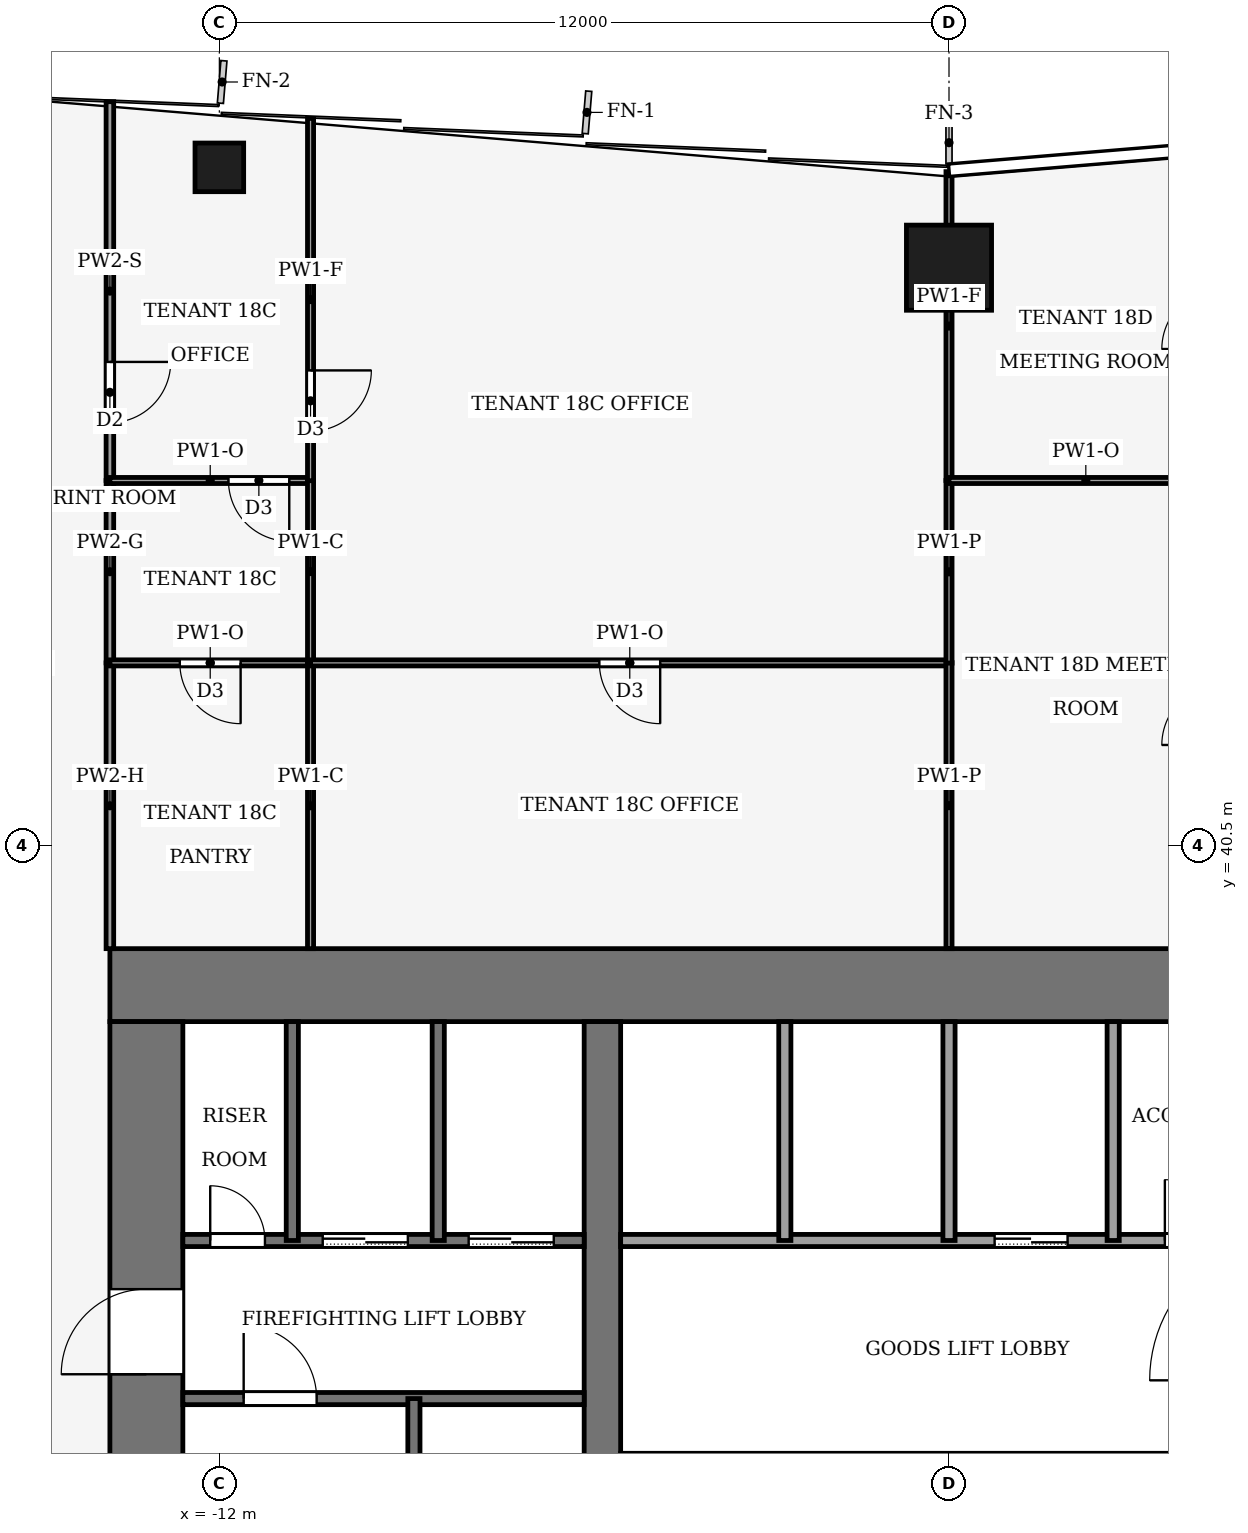
"""IFC4 building model, lengths in metres.
Left out: names, types, materials, properties, quantities, classifications, styles, units other than length and angle.
Written with IfcOpenShell. Run it as: python <this file> out.ifc"""

import sys

from ifc_helpers import new_model, si_unit, direction, frame, frame_2d, origin, origin_2d, place, context, subcontext, project, spatial, rectangle, hollow_rectangle, extrude, element, fill, save


model = new_model("IFC4")
c1 = context("Model", 3, precision=1e-05, world=origin(), true_north=direction((0.0, 1.0)))
c2 = subcontext(c1, "Body", "Model", "MODEL_VIEW")
j1 = project(units=[si_unit("LENGTHUNIT", "METRE"), si_unit("PLANEANGLEUNIT", "RADIAN")], contexts=[c1])
p1 = place(None, origin())
s1 = spatial("IfcSite", under=j1, at=p1, CompositionType="ELEMENT")
p2 = place(p1, origin())
s2 = spatial("IfcBuilding", under=s1, at=p2, CompositionType="ELEMENT")
p3 = place(p2, frame((0.0, 0.0, 82.0)))
s3 = spatial("IfcBuildingStorey", under=s2, at=p3, CompositionType="ELEMENT", Elevation=82.0)
p4 = place(p3, frame((-13.8, 38.2, -0.13), z_axis=(0.0, 0.0, 1.0), x_axis=(1.0, 0.0, 0.0)))
e1 = element("IfcWall", 1, at=p4, inside=s3, PredefinedType="SHEAR", context=c2, shape_type="SweptSolid", body=[
    extrude(rectangle(XDim=27.6, YDim=1.2, at=frame_2d((13.8, 0.0))), origin(), (0.0, 0.0, 1.0), 4.0),
])
p5 = place(p3, frame((-13.2, 18.4, -0.13), z_axis=(0.0, 0.0, 1.0), x_axis=(0.0, 1.0, 0.0)))
e2 = element("IfcWall", 2, at=p5, inside=s3, PredefinedType="SHEAR", context=c2, shape_type="SweptSolid", body=[
    extrude(rectangle(XDim=19.2, YDim=1.2, at=frame_2d((9.6, 0.0))), origin(), (0.0, 0.0, 1.0), 4.0),
])
p6 = place(p5, frame((2.8, 0.0, 0.13)))
e3 = element("IfcOpeningElement", 3, at=p6, cuts=e2, PredefinedType="OPENING", context=c2, shape_type="SweptSolid", body=[
    extrude(rectangle(XDim=2.4, YDim=2.4, at=frame_2d((1.2, 1.2))), frame((0.0, 0.61, 0.0), z_axis=(0.0, -1.0, 0.0), x_axis=(1.0, 0.0, 0.0)), (0.0, 0.0, 1.0), 1.22),
])
p7 = place(p5, frame((13.4, 0.0, 0.13)))
e4 = element("IfcOpeningElement", 4, at=p7, cuts=e2, PredefinedType="OPENING", context=c2, shape_type="SweptSolid", body=[
    extrude(rectangle(XDim=1.4, YDim=2.2, at=frame_2d((0.7, 1.1))), frame((0.0, 0.61, 0.0), z_axis=(0.0, -1.0, 0.0), x_axis=(1.0, 0.0, 0.0)), (0.0, 0.0, 1.0), 1.22),
])
p8 = place(p3, frame((-5.7, 18.4, -0.13), z_axis=(0.0, 0.0, 1.0), x_axis=(0.0, 1.0, 0.0)))
e5 = element("IfcWall", 5, at=p8, inside=s3, PredefinedType="SHEAR", context=c2, shape_type="SweptSolid", body=[
    extrude(rectangle(XDim=19.2, YDim=0.6, at=frame_2d((9.6, 0.0))), origin(), (0.0, 0.0, 1.0), 4.0),
])
p9 = place(p8, frame((8.35, 0.0, 0.13)))
e6 = element("IfcOpeningElement", 6, at=p9, cuts=e5, PredefinedType="OPENING", context=c2, shape_type="SweptSolid", body=[
    extrude(rectangle(XDim=0.9, YDim=2.1, at=frame_2d((0.45, 1.05))), frame((0.0, 0.31, 0.0), z_axis=(0.0, -1.0, 0.0), x_axis=(1.0, 0.0, 0.0)), (0.0, 0.0, 1.0), 0.62),
])
p10 = place(p3, frame((0.0, 50.0, 0.0), z_axis=(0.0, 0.0, 1.0), x_axis=(1.0, 0.0, 0.0)))
e7 = element("IfcColumn", 7, at=p10, inside=s3, PredefinedType="COLUMN", context=c2, shape_type="SweptSolid", body=[
    extrude(hollow_rectangle(XDim=1.4, YDim=1.4, WallThickness=0.08, at=origin_2d()), origin(), (0.0, 0.0, 1.0), 4.0),
])
p11 = place(p3, frame((-12.0, 51.65, 0.0), z_axis=(0.0, 0.0, 1.0), x_axis=(1.0, 0.0, 0.0)))
e8 = element("IfcColumn", 8, at=p11, inside=s3, PredefinedType="COLUMN", context=c2, shape_type="SweptSolid", body=[
    extrude(hollow_rectangle(XDim=0.8, YDim=0.8, WallThickness=0.04, at=origin_2d()), origin(), (0.0, 0.0, 1.0), 4.0),
])
p12 = place(p3, frame((-12.6, 31.4, 0.0), z_axis=(0.0, 0.0, 1.0), x_axis=(1.0, 0.0, 0.0)))
e9 = element("IfcWall", 9, at=p12, inside=s3, PredefinedType="PARTITIONING", context=c2, shape_type="SweptSolid", body=[
    extrude(rectangle(XDim=6.6, YDim=0.2, at=frame_2d((3.3, 0.0))), origin(), (0.0, 0.0, 1.0), 3.87),
])
p13 = place(p12, frame((1.0, 0.0, 0.0)))
e10 = element("IfcOpeningElement", 10, at=p13, cuts=e9, PredefinedType="OPENING", context=c2, shape_type="SweptSolid", body=[
    extrude(rectangle(XDim=1.2, YDim=2.2, at=frame_2d((0.6, 1.1))), frame((0.0, 0.11, 0.0), z_axis=(0.0, -1.0, 0.0), x_axis=(1.0, 0.0, 0.0)), (0.0, 0.0, 1.0), 0.22),
])
p14 = place(p3, frame((-12.6, 34.0, 0.0), z_axis=(0.0, 0.0, 1.0), x_axis=(1.0, 0.0, 0.0)))
e11 = element("IfcWall", 11, at=p14, inside=s3, PredefinedType="PARTITIONING", context=c2, shape_type="SweptSolid", body=[
    extrude(rectangle(XDim=6.6, YDim=0.2, at=frame_2d((3.3, 0.0))), origin(), (0.0, 0.0, 1.0), 3.87),
])
p15 = place(p14, frame((4.7, 0.0, 0.0)))
e12 = element("IfcOpeningElement", 12, at=p15, cuts=e11, PredefinedType="OPENING", context=c2, shape_type="SweptSolid", body=[
    extrude(rectangle(XDim=1.4, YDim=2.2, at=frame_2d((0.7, 1.1))), frame((0.0, 0.11, 0.0), z_axis=(0.0, -1.0, 0.0), x_axis=(1.0, 0.0, 0.0)), (0.0, 0.0, 1.0), 0.22),
])
p16 = place(p14, frame((2.3, 0.0, 0.0)))
e13 = element("IfcOpeningElement", 13, at=p16, cuts=e11, PredefinedType="OPENING", context=c2, shape_type="SweptSolid", body=[
    extrude(rectangle(XDim=1.4, YDim=2.2, at=frame_2d((0.7, 1.1))), frame((0.0, 0.11, 0.0), z_axis=(0.0, -1.0, 0.0), x_axis=(1.0, 0.0, 0.0)), (0.0, 0.0, 1.0), 0.22),
])
p17 = place(p14, frame((0.45, 0.0, 0.0)))
e14 = element("IfcOpeningElement", 14, at=p17, cuts=e11, PredefinedType="OPENING", context=c2, shape_type="SweptSolid", body=[
    extrude(rectangle(XDim=0.9, YDim=2.1, at=frame_2d((0.45, 1.05))), frame((0.0, 0.11, 0.0), z_axis=(0.0, -1.0, 0.0), x_axis=(1.0, 0.0, 0.0)), (0.0, 0.0, 1.0), 0.22),
])
p18 = place(p3, frame((-5.4, 34.0, 0.0), z_axis=(0.0, 0.0, 1.0), x_axis=(1.0, 0.0, 0.0)))
e15 = element("IfcWall", 15, at=p18, inside=s3, PredefinedType="PARTITIONING", context=c2, shape_type="SweptSolid", body=[
    extrude(rectangle(XDim=10.8, YDim=0.2, at=frame_2d((5.4, 0.0))), origin(), (0.0, 0.0, 1.0), 3.87),
])
p19 = place(p18, frame((6.15, 0.0, 0.0)))
e16 = element("IfcOpeningElement", 16, at=p19, cuts=e15, PredefinedType="OPENING", context=c2, shape_type="SweptSolid", body=[
    extrude(rectangle(XDim=1.2, YDim=2.2, at=frame_2d((0.6, 1.1))), frame((0.0, 0.11, 0.0), z_axis=(0.0, -1.0, 0.0), x_axis=(1.0, 0.0, 0.0)), (0.0, 0.0, 1.0), 0.22),
])
p20 = place(p18, frame((8.95, 0.0, 0.0)))
e17 = element("IfcOpeningElement", 17, at=p20, cuts=e15, PredefinedType="OPENING", context=c2, shape_type="SweptSolid", body=[
    extrude(rectangle(XDim=1.0, YDim=2.1, at=frame_2d((0.5, 1.05))), frame((0.0, 0.11, 0.0), z_axis=(0.0, -1.0, 0.0), x_axis=(1.0, 0.0, 0.0)), (0.0, 0.0, 1.0), 0.22),
])
p21 = place(p3, frame((-10.8, 34.0, 0.0), z_axis=(0.0, 0.0, 1.0), x_axis=(0.0, 1.0, 0.0)))
e18 = element("IfcWall", 18, at=p21, inside=s3, PredefinedType="PARTITIONING", context=c2, shape_type="SweptSolid", body=[
    extrude(rectangle(XDim=3.6, YDim=0.2, at=frame_2d((1.8, 0.0))), origin(), (0.0, 0.0, 1.0), 3.87),
])
p22 = place(p3, frame((-8.8, 24.0, 0.0), z_axis=(0.0, 0.0, 1.0), x_axis=(0.0, 1.0, 0.0)))
e19 = element("IfcWall", 19, at=p22, inside=s3, PredefinedType="PARTITIONING", context=c2, shape_type="SweptSolid", body=[
    extrude(rectangle(XDim=7.4, YDim=0.2, at=frame_2d((3.7, 0.0))), origin(), (0.0, 0.0, 1.0), 3.87),
])
for number, where, z_axis, x_axis in (
    (20, (-8.4, 34.0, 0.0), (0.0, 0.0, 1.0), (0.0, 1.0, 0.0)),
    (21, (-2.7, 34.0, 0.0), (0.0, 0.0, 1.0), (0.0, 1.0, 0.0)),
    (22, (0.0, 34.0, 0.0), (0.0, 0.0, 1.0), (0.0, 1.0, 0.0)),
    (23, (2.7, 34.0, 0.0), (0.0, 0.0, 1.0), (0.0, 1.0, 0.0)),
):
    element("IfcWall", number, at=place(p3, frame(where, z_axis=z_axis, x_axis=x_axis)), inside=s3, PredefinedType="PARTITIONING", context=c2, shape_type="SweptSolid", body=[
        extrude(rectangle(XDim=3.6, YDim=0.2, at=frame_2d((1.8, 0.0))), origin(), (0.0, 0.0, 1.0), 3.87),
    ])
p23 = place(p3, frame((-13.8, 38.8, 0.0), z_axis=(0.0, 0.0, 1.0), x_axis=(0.0, 1.0, 0.0)))
e24 = element("IfcWall", 24, at=p23, inside=s3, PredefinedType="PARTITIONING", context=c2, shape_type="SweptSolid", body=[
    extrude(rectangle(XDim=4.7, YDim=0.125, at=frame_2d((2.35, 0.0))), origin(), (0.0, 0.0, 1.0), 3.14),
])
p24 = place(p3, frame((-13.8, 43.5, 0.0), z_axis=(0.0, 0.0, 1.0), x_axis=(0.0, 1.0, 0.0)))
e25 = element("IfcWall", 25, at=p24, inside=s3, PredefinedType="PARTITIONING", context=c2, shape_type="SweptSolid", body=[
    extrude(rectangle(XDim=3.0, YDim=0.125, at=frame_2d((1.5, 0.0))), origin(), (0.0, 0.0, 1.0), 3.87),
])
p25 = place(p3, frame((-13.8, 52.73, 0.0), z_axis=(0.0, 0.0, 1.0), x_axis=(0.0, -1.0, 0.0)))
e26 = element("IfcWall", 26, at=p25, inside=s3, PredefinedType="PARTITIONING", context=c2, shape_type="SweptSolid", body=[
    extrude(rectangle(XDim=6.23, YDim=0.125, at=frame_2d((3.115, 0.0))), origin(), (0.0, 0.0, 1.0), 3.04),
])
p26 = place(p25, frame((4.28, 0.0, 0.0)))
e27 = element("IfcOpeningElement", 27, at=p26, cuts=e26, PredefinedType="OPENING", context=c2, shape_type="SweptSolid", body=[
    extrude(rectangle(XDim=1.0, YDim=2.1, at=frame_2d((0.5, 1.05))), frame((0.0, 0.073, 0.0), z_axis=(0.0, -1.0, 0.0), x_axis=(1.0, 0.0, 0.0)), (0.0, 0.0, 1.0), 0.145),
])
p27 = place(p3, frame((-10.5, 43.5, 0.0), z_axis=(0.0, 0.0, 1.0), x_axis=(-1.0, 0.0, 0.0)))
e28 = element("IfcWall", 28, at=p27, inside=s3, PredefinedType="PARTITIONING", context=c2, shape_type="SweptSolid", body=[
    extrude(rectangle(XDim=3.3, YDim=0.1, at=frame_2d((1.65, 0.0))), origin(), (0.0, 0.0, 1.0), 3.39),
])
p28 = place(p27, frame((1.15, 0.0, 0.0)))
e29 = element("IfcOpeningElement", 29, at=p28, cuts=e28, PredefinedType="OPENING", context=c2, shape_type="SweptSolid", body=[
    extrude(rectangle(XDim=1.0, YDim=2.1, at=frame_2d((0.5, 1.05))), frame((0.0, 0.06, 0.0), z_axis=(0.0, -1.0, 0.0), x_axis=(1.0, 0.0, 0.0)), (0.0, 0.0, 1.0), 0.12),
])
p29 = place(p3, frame((-10.5, 38.8, 0.0), z_axis=(0.0, 0.0, 1.0), x_axis=(0.0, 1.0, 0.0)))
e30 = element("IfcWall", 30, at=p29, inside=s3, PredefinedType="PARTITIONING", context=c2, shape_type="SweptSolid", body=[
    extrude(rectangle(XDim=4.7, YDim=0.1, at=frame_2d((2.35, 0.0))), origin(), (0.0, 0.0, 1.0), 3.87),
])
p30 = place(p3, frame((-10.5, 46.5, 0.0), z_axis=(0.0, 0.0, 1.0), x_axis=(-1.0, 0.0, 0.0)))
e31 = element("IfcWall", 31, at=p30, inside=s3, PredefinedType="PARTITIONING", context=c2, shape_type="SweptSolid", body=[
    extrude(rectangle(XDim=3.3, YDim=0.1, at=frame_2d((1.65, 0.0))), origin(), (0.0, 0.0, 1.0), 3.39),
])
p31 = place(p30, frame((0.35, 0.0, 0.0)))
e32 = element("IfcOpeningElement", 32, at=p31, cuts=e31, PredefinedType="OPENING", context=c2, shape_type="SweptSolid", body=[
    extrude(rectangle(XDim=1.0, YDim=2.1, at=frame_2d((0.5, 1.05))), frame((0.0, 0.06, 0.0), z_axis=(0.0, -1.0, 0.0), x_axis=(1.0, 0.0, 0.0)), (0.0, 0.0, 1.0), 0.12),
])
p32 = place(p3, frame((-10.5, 43.5, 0.0), z_axis=(0.0, 0.0, 1.0), x_axis=(0.0, 1.0, 0.0)))
e33 = element("IfcWall", 33, at=p32, inside=s3, PredefinedType="PARTITIONING", context=c2, shape_type="SweptSolid", body=[
    extrude(rectangle(XDim=3.004, YDim=0.1, at=frame_2d((1.502, 0.0))), origin(), (0.0, 0.0, 1.0), 3.87),
])
p33 = place(p3, frame((-10.5, 52.455, 0.0), z_axis=(0.0, 0.0, 1.0), x_axis=(0.0, -1.0, 0.0)))
e34 = element("IfcWall", 34, at=p33, inside=s3, PredefinedType="PARTITIONING", context=c2, shape_type="SweptSolid", body=[
    extrude(rectangle(XDim=5.959, YDim=0.1, at=frame_2d((2.979, 0.0))), origin(), (0.0, 0.0, 1.0), 3.04),
])
p34 = place(p33, frame((4.145, 0.0, 0.0)))
e35 = element("IfcOpeningElement", 35, at=p34, cuts=e34, PredefinedType="OPENING", context=c2, shape_type="SweptSolid", body=[
    extrude(rectangle(XDim=1.0, YDim=2.1, at=frame_2d((0.5, 1.05))), frame((0.0, 0.06, 0.0), z_axis=(0.0, -1.0, 0.0), x_axis=(1.0, 0.0, 0.0)), (0.0, 0.0, 1.0), 0.12),
])
p35 = place(p3, frame((0.0, 43.5, 0.0), z_axis=(0.0, 0.0, 1.0), x_axis=(-1.0, 0.0, 0.0)))
e36 = element("IfcWall", 36, at=p35, inside=s3, PredefinedType="PARTITIONING", context=c2, shape_type="SweptSolid", body=[
    extrude(rectangle(XDim=10.5, YDim=0.1, at=frame_2d((5.25, 0.0))), origin(), (0.0, 0.0, 1.0), 3.39),
])
p36 = place(p35, frame((4.75, 0.0, 0.0)))
e37 = element("IfcOpeningElement", 37, at=p36, cuts=e36, PredefinedType="OPENING", context=c2, shape_type="SweptSolid", body=[
    extrude(rectangle(XDim=1.0, YDim=2.1, at=frame_2d((0.5, 1.05))), frame((0.0, 0.06, 0.0), z_axis=(0.0, -1.0, 0.0), x_axis=(1.0, 0.0, 0.0)), (0.0, 0.0, 1.0), 0.12),
])
p37 = place(p3, frame((0.0, 38.8, 0.0), z_axis=(0.0, 0.0, 1.0), x_axis=(0.0, 1.0, 0.0)))
e38 = element("IfcWall", 38, at=p37, inside=s3, PredefinedType="PARTITIONING", context=c2, shape_type="SweptSolid", body=[
    extrude(rectangle(XDim=4.704, YDim=0.1, at=frame_2d((2.352, 0.0))), origin(), (0.0, 0.0, 1.0), 3.44),
])
p38 = place(p3, frame((0.0, 43.496, 0.0), z_axis=(0.0, 0.0, 1.0), x_axis=(0.0, 1.0, 0.0)))
e39 = element("IfcWall", 39, at=p38, inside=s3, PredefinedType="PARTITIONING", context=c2, shape_type="SweptSolid", body=[
    extrude(rectangle(XDim=3.004, YDim=0.1, at=frame_2d((1.502, 0.0))), origin(), (0.0, 0.0, 1.0), 3.44),
])
p39 = place(p3, frame((0.0, 46.5, 0.0), z_axis=(0.0, 0.0, 1.0), x_axis=(0.0, 1.0, 0.0)))
e40 = element("IfcWall", 40, at=p39, inside=s3, PredefinedType="PARTITIONING", context=c2, shape_type="SweptSolid", body=[
    extrude(rectangle(XDim=5.08, YDim=0.1, at=frame_2d((2.54, 0.0))), origin(), (0.0, 0.0, 1.0), 3.04),
])
p40 = place(p3, frame((4.5, 46.5, 0.0), z_axis=(0.0, 0.0, 1.0), x_axis=(-1.0, 0.0, 0.0)))
e41 = element("IfcWall", 41, at=p40, inside=s3, PredefinedType="PARTITIONING", context=c2, shape_type="SweptSolid", body=[
    extrude(rectangle(XDim=4.5, YDim=0.1, at=frame_2d((2.25, 0.0))), origin(), (0.0, 0.0, 1.0), 3.39),
])
p41 = place(p19, origin())
e42 = element("IfcDoor", 42, at=p41, inside=s3, OperationType="SLIDING_TO_LEFT", PredefinedType="DOOR", context=c2, shape_type="SweptSolid", body=[
    extrude(rectangle(XDim=1.2, YDim=2.2, at=frame_2d((0.6, 1.1))), frame((0.0, 0.025, 0.0), z_axis=(0.0, -1.0, 0.0), x_axis=(1.0, 0.0, 0.0)), (0.0, 0.0, 1.0), 0.05),
])
fill(e16, e42)
p42 = place(p15, origin())
e43 = element("IfcDoor", 43, at=p42, inside=s3, OperationType="SLIDING_TO_LEFT", PredefinedType="DOOR", context=c2, shape_type="SweptSolid", body=[
    extrude(rectangle(XDim=1.4, YDim=2.2, at=frame_2d((0.7, 1.1))), frame((0.0, 0.025, 0.0), z_axis=(0.0, -1.0, 0.0), x_axis=(1.0, 0.0, 0.0)), (0.0, 0.0, 1.0), 0.05),
])
fill(e12, e43)
p43 = place(p16, origin())
e44 = element("IfcDoor", 44, at=p43, inside=s3, OperationType="SLIDING_TO_LEFT", PredefinedType="DOOR", context=c2, shape_type="SweptSolid", body=[
    extrude(rectangle(XDim=1.4, YDim=2.2, at=frame_2d((0.7, 1.1))), frame((0.0, 0.025, 0.0), z_axis=(0.0, -1.0, 0.0), x_axis=(1.0, 0.0, 0.0)), (0.0, 0.0, 1.0), 0.05),
])
fill(e13, e44)
p44 = place(p17, origin())
e45 = element("IfcDoor", 45, at=p44, inside=s3, OperationType="SINGLE_SWING_RIGHT", PredefinedType="DOOR", context=c2, shape_type="SweptSolid", body=[
    extrude(rectangle(XDim=0.9, YDim=2.1, at=frame_2d((0.45, 1.05))), frame((0.0, 0.025, 0.0), z_axis=(0.0, -1.0, 0.0), x_axis=(1.0, 0.0, 0.0)), (0.0, 0.0, 1.0), 0.05),
])
fill(e14, e45)
p45 = place(p20, origin())
e46 = element("IfcDoor", 46, at=p45, inside=s3, OperationType="SINGLE_SWING_LEFT", PredefinedType="DOOR", context=c2, shape_type="SweptSolid", body=[
    extrude(rectangle(XDim=1.0, YDim=2.1, at=frame_2d((0.5, 1.05))), frame((0.0, 0.025, 0.0), z_axis=(0.0, -1.0, 0.0), x_axis=(1.0, 0.0, 0.0)), (0.0, 0.0, 1.0), 0.05),
])
fill(e17, e46)
p46 = place(p13, origin())
e47 = element("IfcDoor", 47, at=p46, inside=s3, OperationType="SINGLE_SWING_RIGHT", PredefinedType="DOOR", context=c2, shape_type="SweptSolid", body=[
    extrude(rectangle(XDim=1.2, YDim=2.2, at=frame_2d((0.6, 1.1))), frame((0.0, 0.025, 0.0), z_axis=(0.0, -1.0, 0.0), x_axis=(1.0, 0.0, 0.0)), (0.0, 0.0, 1.0), 0.05),
])
fill(e10, e47)
p47 = place(p7, origin())
e48 = element("IfcDoor", 48, at=p47, inside=s3, OperationType="SINGLE_SWING_RIGHT", PredefinedType="DOOR", context=c2, shape_type="SweptSolid", body=[
    extrude(rectangle(XDim=1.4, YDim=2.2, at=frame_2d((0.7, 1.1))), frame((0.0, 0.025, 0.0), z_axis=(0.0, -1.0, 0.0), x_axis=(1.0, 0.0, 0.0)), (0.0, 0.0, 1.0), 0.05),
])
fill(e4, e48)
p48 = place(p26, origin())
e49 = element("IfcDoor", 49, at=p48, inside=s3, OperationType="SINGLE_SWING_RIGHT", PredefinedType="DOOR", context=c2, shape_type="SweptSolid", body=[
    extrude(rectangle(XDim=1.0, YDim=2.1, at=frame_2d((0.5, 1.05))), frame((0.0, 0.025, 0.0), z_axis=(0.0, -1.0, 0.0), x_axis=(1.0, 0.0, 0.0)), (0.0, 0.0, 1.0), 0.05),
])
fill(e27, e49)
p49 = place(p28, origin())
e50 = element("IfcDoor", 50, at=p49, inside=s3, OperationType="SINGLE_SWING_LEFT", PredefinedType="DOOR", context=c2, shape_type="SweptSolid", body=[
    extrude(rectangle(XDim=1.0, YDim=2.1, at=frame_2d((0.5, 1.05))), frame((0.0, 0.025, 0.0), z_axis=(0.0, -1.0, 0.0), x_axis=(1.0, 0.0, 0.0)), (0.0, 0.0, 1.0), 0.05),
])
fill(e29, e50)
p50 = place(p31, origin())
e51 = element("IfcDoor", 51, at=p50, inside=s3, OperationType="SINGLE_SWING_LEFT", PredefinedType="DOOR", context=c2, shape_type="SweptSolid", body=[
    extrude(rectangle(XDim=1.0, YDim=2.1, at=frame_2d((0.5, 1.05))), frame((0.0, 0.025, 0.0), z_axis=(0.0, -1.0, 0.0), x_axis=(1.0, 0.0, 0.0)), (0.0, 0.0, 1.0), 0.05),
])
fill(e32, e51)
p51 = place(p34, origin())
e52 = element("IfcDoor", 52, at=p51, inside=s3, OperationType="SINGLE_SWING_RIGHT", PredefinedType="DOOR", context=c2, shape_type="SweptSolid", body=[
    extrude(rectangle(XDim=1.0, YDim=2.1, at=frame_2d((0.5, 1.05))), frame((0.0, 0.025, 0.0), z_axis=(0.0, -1.0, 0.0), x_axis=(1.0, 0.0, 0.0)), (0.0, 0.0, 1.0), 0.05),
])
fill(e35, e52)
p52 = place(p36, origin())
e53 = element("IfcDoor", 53, at=p52, inside=s3, OperationType="SINGLE_SWING_RIGHT", PredefinedType="DOOR", context=c2, shape_type="SweptSolid", body=[
    extrude(rectangle(XDim=1.0, YDim=2.1, at=frame_2d((0.5, 1.05))), frame((0.0, 0.025, 0.0), z_axis=(0.0, -1.0, 0.0), x_axis=(1.0, 0.0, 0.0)), (0.0, 0.0, 1.0), 0.05),
])
fill(e37, e53)
save(model, sys.argv[1])
